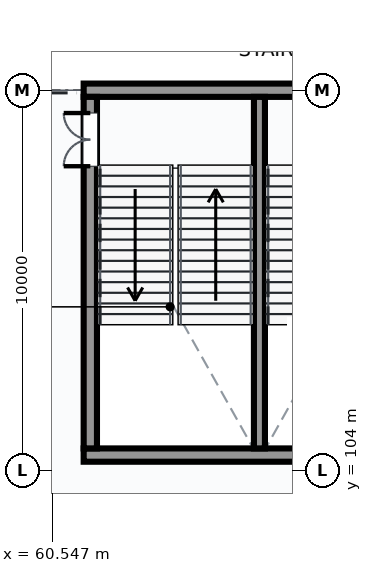
"""IFC4 building model, lengths in metres.
Left out: names, types, materials, properties, quantities, classifications, styles, units other than length and angle.
Written with IfcOpenShell. Run it as: python <this file> out.ifc"""

import sys

from ifc_helpers import new_model, si_unit, direction, frame, frame_2d, origin, place, context, subcontext, project, spatial, rectangle, extrude, element, fill, save


model = new_model("IFC4")
c1 = context("Model", 3, precision=1e-05, world=origin(), true_north=direction((0.0, 1.0)))
c2 = subcontext(c1, "Body", "Model", "MODEL_VIEW")
j1 = project(units=[si_unit("LENGTHUNIT", "METRE"), si_unit("PLANEANGLEUNIT", "RADIAN")], contexts=[c1])
p1 = place(None, origin())
s1 = spatial("IfcSite", under=j1, at=p1, CompositionType="ELEMENT")
p2 = place(p1, origin())
s2 = spatial("IfcBuilding", under=s1, at=p2, CompositionType="ELEMENT")
p3 = place(p2, frame((0.0, 0.0, 19.2)))
s3 = spatial("IfcBuildingStorey", under=s2, at=p3, CompositionType="ELEMENT", Elevation=19.2)
p4 = place(p3, frame((61.375, 104.4, 0.0), z_axis=(0.0, 0.0, 1.0), x_axis=(1.0, 0.0, 0.0)))
e1 = element("IfcWall", 1, at=p4, inside=s3, PredefinedType="SHEAR", context=c2, shape_type="SweptSolid", body=[
    extrude(rectangle(XDim=9.25, YDim=0.35, at=frame_2d((4.625, 0.0))), origin(), (0.0, 0.0, 1.0), 5.4),
])
p5 = place(p3, frame((61.375, 114.0, 0.0), z_axis=(0.0, 0.0, 1.0), x_axis=(1.0, 0.0, 0.0)))
e2 = element("IfcWall", 2, at=p5, inside=s3, PredefinedType="SHEAR", context=c2, shape_type="SweptSolid", body=[
    extrude(rectangle(XDim=9.25, YDim=0.35, at=frame_2d((4.625, 0.0))), origin(), (0.0, 0.0, 1.0), 4.506),
])
p6 = place(p3, frame((61.55, 104.575, 0.0), z_axis=(0.0, 0.0, 1.0), x_axis=(0.0, 1.0, 0.0)))
e3 = element("IfcWall", 3, at=p6, inside=s3, PredefinedType="SHEAR", context=c2, shape_type="SweptSolid", body=[
    extrude(rectangle(XDim=9.25, YDim=0.35, at=frame_2d((4.625, 0.0))), origin(), (0.0, 0.0, 1.0), 5.4),
])
p7 = place(p6, frame((7.425, 0.0, 0.0)))
e4 = element("IfcOpeningElement", 4, at=p7, cuts=e3, PredefinedType="OPENING", context=c2, shape_type="SweptSolid", body=[
    extrude(rectangle(XDim=1.4, YDim=2.2, at=frame_2d((0.7, 1.1))), frame((0.0, 0.185, 0.0), z_axis=(0.0, -1.0, 0.0), x_axis=(1.0, 0.0, 0.0)), (0.0, 0.0, 1.0), 0.37),
])
p8 = place(p3, frame((66.0, 104.575, 0.0), z_axis=(0.0, 0.0, 1.0), x_axis=(0.0, 1.0, 0.0)))
e5 = element("IfcWall", 5, at=p8, inside=s3, PredefinedType="SHEAR", context=c2, shape_type="SweptSolid", body=[
    extrude(rectangle(XDim=9.25, YDim=0.29, at=frame_2d((4.625, 0.0))), origin(), (0.0, 0.0, 1.0), 5.4),
])
p9 = place(p7, frame((1.4, 0.0, 0.0), z_axis=(0.0, 0.0, 1.0), x_axis=(-1.0, 0.0, 0.0)))
e6 = element("IfcDoor", 6, at=p9, inside=s3, OperationType="DOUBLE_DOOR_SINGLE_SWING", PredefinedType="DOOR", context=c2, shape_type="SweptSolid", body=[
    extrude(rectangle(XDim=1.4, YDim=2.2, at=frame_2d((0.7, 1.1))), frame((0.0, 0.025, 0.0), z_axis=(0.0, -1.0, 0.0), x_axis=(1.0, 0.0, 0.0)), (0.0, 0.0, 1.0), 0.05),
])
fill(e4, e6)
save(model, sys.argv[1])
